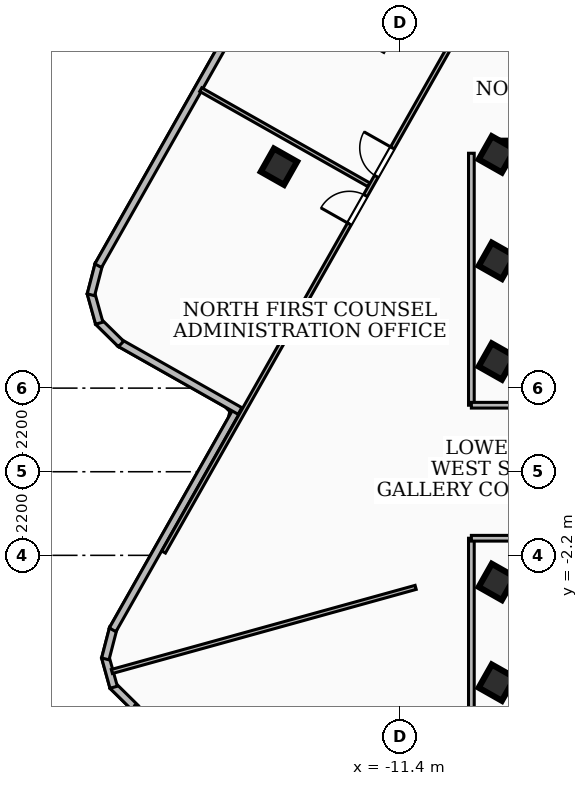
"""IFC4 building model, lengths in metres.
Left out: names, types, materials, properties, quantities, classifications, styles, units other than length and angle.
Written with IfcOpenShell. Run it as: python <this file> out.ifc"""

import sys

from ifc_helpers import new_model, si_unit, direction, frame, frame_2d, origin, origin_2d, place, context, subcontext, project, spatial, rectangle, extrude, element, fill, save


model = new_model("IFC4")
c1 = context("Model", 3, precision=1e-05, world=origin(), true_north=direction((0.0, 1.0)))
c2 = subcontext(c1, "Body", "Model", "MODEL_VIEW")
j1 = project(units=[si_unit("LENGTHUNIT", "METRE"), si_unit("PLANEANGLEUNIT", "RADIAN")], contexts=[c1])
p1 = place(None, origin())
s1 = spatial("IfcSite", under=j1, at=p1, CompositionType="ELEMENT")
p2 = place(p1, origin())
s2 = spatial("IfcBuilding", under=s1, at=p2, CompositionType="ELEMENT")
p3 = place(p2, frame((0.0, 0.0, 278.28)))
s3 = spatial("IfcBuildingStorey", under=s2, at=p3, CompositionType="ELEMENT", Elevation=278.28)
p4 = place(p3, frame((-8.78, 8.51, 0.0), z_axis=(0.0, 0.0, 1.0), x_axis=(1.0, 0.0, 0.0)))
e1 = element("IfcWall", 1, at=p4, inside=s3, PredefinedType="SHEAR", context=c2, shape_type="SweptSolid", body=[
    extrude(rectangle(XDim=17.56, YDim=0.4, at=frame_2d((8.78, 0.0))), origin(), (0.0, 0.0, 1.0), 3.16),
])
for number, where, z_axis, x_axis in (
    (2, (-8.85, -5.55, 0.0), (0.0, 0.0, 1.0), (0.493, 0.87, 0.0)),
    (3, (-8.85, -2.9, 0.0), (0.0, 0.0, 1.0), (0.493, 0.87, 0.0)),
    (4, (-8.85, 2.9, 0.0), (0.0, 0.0, 1.0), (0.493, 0.87, 0.0)),
    (5, (-8.85, 5.55, 0.0), (0.0, 0.0, 1.0), (0.493, 0.87, 0.0)),
    (6, (-8.85, 8.35, 0.0), (0.0, 0.0, 1.0), (0.493, 0.87, 0.0)),
    (7, (-14.583, 8.026, 0.0), (0.0, 0.0, 1.0), (0.493, 0.87, 0.0)),
):
    element("IfcColumn", number, at=place(p3, frame(where, z_axis=z_axis, x_axis=x_axis)), inside=s3, PredefinedType="COLUMN", context=c2, shape_type="SweptSolid", body=[
        extrude(rectangle(XDim=0.7, YDim=0.7, at=origin_2d()), origin(), (0.0, 0.0, 1.0), 3.42),
    ])
p5 = place(p3, frame((-18.359, -6.218, 0.0), z_axis=(0.0, 0.0, 1.0), x_axis=(-0.712466161804, 0.701706468749, 0.0)))
e8 = element("IfcWall", 8, at=p5, inside=s3, PredefinedType="SOLIDWALL", context=c2, shape_type="SweptSolid", body=[
    extrude(rectangle(XDim=0.84, YDim=0.2, at=frame_2d((0.42, 0.0))), origin(), (0.0, 0.0, 1.0), 3.16),
])
p6 = place(p3, frame((-18.932, -5.671, 0.0), z_axis=(0.0, 0.0, 1.0), x_axis=(-0.268377126675, 0.963313924885, 0.0)))
e9 = element("IfcWall", 9, at=p6, inside=s3, PredefinedType="SOLIDWALL", context=c2, shape_type="SweptSolid", body=[
    extrude(rectangle(XDim=0.824, YDim=0.2, at=frame_2d((0.412, 0.0))), origin(), (0.0, 0.0, 1.0), 3.16),
])
p7 = place(p3, frame((-19.152, -4.925, 0.0), z_axis=(0.0, 0.0, 1.0), x_axis=(0.250891369276, 0.968015248239, 0.0)))
e10 = element("IfcWall", 10, at=p7, inside=s3, PredefinedType="SOLIDWALL", context=c2, shape_type="SweptSolid", body=[
    extrude(rectangle(XDim=0.838, YDim=0.2, at=frame_2d((0.419, 0.0))), origin(), (0.0, 0.0, 1.0), 3.16),
])
p8 = place(p3, frame((-18.96, -4.16, 0.0), z_axis=(0.0, 0.0, 1.0), x_axis=(0.492441425139, 0.870345588147, 0.0)))
e11 = element("IfcWall", 11, at=p8, inside=s3, PredefinedType="SOLIDWALL", context=c2, shape_type="SweptSolid", body=[
    extrude(rectangle(XDim=6.742, YDim=0.2, at=frame_2d((3.371, 0.0))), origin(), (0.0, 0.0, 1.0), 3.16),
])
p9 = place(p3, frame((-15.609, 1.599, 0.0), z_axis=(0.0, 0.0, 1.0), x_axis=(-0.87036421417, 0.49240850388, 0.0)))
e12 = element("IfcWall", 12, at=p9, inside=s3, PredefinedType="SOLIDWALL", context=c2, shape_type="SweptSolid", body=[
    extrude(rectangle(XDim=3.641, YDim=0.2, at=frame_2d((1.821, 0.0))), origin(), (0.0, 0.0, 1.0), 3.16),
])
p10 = place(p3, frame((-18.738, 3.362, 0.0), z_axis=(0.0, 0.0, 1.0), x_axis=(-0.712468358306, 0.70170423856, 0.0)))
e13 = element("IfcWall", 13, at=p10, inside=s3, PredefinedType="SOLIDWALL", context=c2, shape_type="SweptSolid", body=[
    extrude(rectangle(XDim=0.839, YDim=0.2, at=frame_2d((0.419, 0.0))), origin(), (0.0, 0.0, 1.0), 3.16),
])
p11 = place(p3, frame((-19.311, 3.909, 0.0), z_axis=(0.0, 0.0, 1.0), x_axis=(-0.267720149776, 0.963496715824, 0.0)))
e14 = element("IfcWall", 14, at=p11, inside=s3, PredefinedType="SOLIDWALL", context=c2, shape_type="SweptSolid", body=[
    extrude(rectangle(XDim=0.825, YDim=0.2, at=frame_2d((0.413, 0.0))), origin(), (0.0, 0.0, 1.0), 3.16),
])
p12 = place(p3, frame((-19.531, 4.656, 0.0), z_axis=(0.0, 0.0, 1.0), x_axis=(0.250618286331, 0.968085985105, 0.0)))
e15 = element("IfcWall", 15, at=p12, inside=s3, PredefinedType="SOLIDWALL", context=c2, shape_type="SweptSolid", body=[
    extrude(rectangle(XDim=0.838, YDim=0.2, at=frame_2d((0.419, 0.0))), origin(), (0.0, 0.0, 1.0), 3.16),
])
p13 = place(p3, frame((-19.339, 5.421, 0.0), z_axis=(0.0, 0.0, 1.0), x_axis=(0.492615794655, 0.870246906835, 0.0)))
e16 = element("IfcWall", 16, at=p13, inside=s3, PredefinedType="SOLIDWALL", context=c2, shape_type="SweptSolid", body=[
    extrude(rectangle(XDim=10.124, YDim=0.2, at=frame_2d((5.062, 0.0))), origin(), (0.0, 0.0, 1.0), 3.16),
])
p14 = place(p13, frame((6.996, 0.0, 0.85)))
e17 = element("IfcOpeningElement", 17, at=p14, cuts=e16, PredefinedType="OPENING", context=c2, shape_type="SweptSolid", body=[
    extrude(rectangle(XDim=1.8, YDim=1.8, at=frame_2d((0.9, 0.9))), frame((0.0, 0.11, 0.0), z_axis=(0.0, -1.0, 0.0), x_axis=(1.0, 0.0, 0.0)), (0.0, 0.0, 1.0), 0.22),
])
p15 = place(p3, frame((-9.52, 1.75, 0.0), z_axis=(0.0, 0.0, 1.0), x_axis=(0.0, 1.0, 0.0)))
e18 = element("IfcWall", 18, at=p15, inside=s3, PredefinedType="PARTITIONING", context=c2, shape_type="SweptSolid", body=[
    extrude(rectangle(XDim=6.63, YDim=0.15, at=frame_2d((3.315, 0.0))), origin(), (0.0, 0.0, 1.0), 2.53),
])
p16 = place(p3, frame((-7.85, 1.75, 0.0), z_axis=(0.0, 0.0, 1.0), x_axis=(-1.0, 0.0, 0.0)))
e19 = element("IfcWall", 19, at=p16, inside=s3, PredefinedType="PARTITIONING", context=c2, shape_type="SweptSolid", body=[
    extrude(rectangle(XDim=1.67, YDim=0.15, at=frame_2d((0.835, 0.0))), origin(), (0.0, 0.0, 1.0), 2.39),
])
p17 = place(p3, frame((-9.52, -8.38, 0.0), z_axis=(0.0, 0.0, 1.0), x_axis=(0.0, 1.0, 0.0)))
e20 = element("IfcWall", 20, at=p17, inside=s3, PredefinedType="PARTITIONING", context=c2, shape_type="SweptSolid", body=[
    extrude(rectangle(XDim=6.63, YDim=0.15, at=frame_2d((3.315, 0.0))), origin(), (0.0, 0.0, 1.0), 3.16),
])
p18 = place(p3, frame((-7.85, -1.75, 0.0), z_axis=(0.0, 0.0, 1.0), x_axis=(-1.0, 0.0, 0.0)))
e21 = element("IfcWall", 21, at=p18, inside=s3, PredefinedType="PARTITIONING", context=c2, shape_type="SweptSolid", body=[
    extrude(rectangle(XDim=1.67, YDim=0.15, at=frame_2d((0.835, 0.0))), origin(), (0.0, 0.0, 1.0), 2.39),
])
p19 = place(p3, frame((-10.986, -3.043, 0.0), z_axis=(0.0, 0.0, 1.0), x_axis=(-0.963747373359, -0.266816416929, 0.0)))
e22 = element("IfcWall", 22, at=p19, inside=s3, PredefinedType="PARTITIONING", context=c2, shape_type="SweptSolid", body=[
    extrude(rectangle(XDim=8.295, YDim=0.11, at=frame_2d((4.147, 0.0))), origin(), (0.0, 0.0, 1.0), 3.16),
])
p20 = place(p3, frame((-12.216, 7.549, 0.0), z_axis=(0.0, 0.0, 1.0), x_axis=(-0.870245204201, 0.492618802488, 0.0)))
e23 = element("IfcWall", 23, at=p20, inside=s3, PredefinedType="PARTITIONING", context=c2, shape_type="SweptSolid", body=[
    extrude(rectangle(XDim=5.085, YDim=0.11, at=frame_2d((2.542, 0.0))), origin(), (0.0, 0.0, 1.0), 2.53),
])
p21 = place(p3, frame((-17.619, -2.113, 0.0), z_axis=(0.0, 0.0, 1.0), x_axis=(0.492746831558, 0.870172718482, 0.0)))
e24 = element("IfcWall", 24, at=p21, inside=s3, PredefinedType="PARTITIONING", context=c2, shape_type="SweptSolid", body=[
    extrude(rectangle(XDim=20.54, YDim=0.11, at=frame_2d((10.27, 0.0))), origin(), (0.0, 0.0, 1.0), 2.53),
])
p22 = place(p21, frame((11.36, 0.0, 0.0)))
e25 = element("IfcOpeningElement", 25, at=p22, cuts=e24, PredefinedType="OPENING", context=c2, shape_type="SweptSolid", body=[
    extrude(rectangle(XDim=0.86, YDim=2.04, at=frame_2d((0.43, 1.02))), frame((0.0, 0.065, 0.0), z_axis=(0.0, -1.0, 0.0), x_axis=(1.0, 0.0, 0.0)), (0.0, 0.0, 1.0), 0.13),
])
p23 = place(p21, frame((9.92, 0.0, 0.0)))
e26 = element("IfcOpeningElement", 26, at=p23, cuts=e24, PredefinedType="OPENING", context=c2, shape_type="SweptSolid", body=[
    extrude(rectangle(XDim=0.86, YDim=2.04, at=frame_2d((0.43, 1.02))), frame((0.0, 0.065, 0.0), z_axis=(0.0, -1.0, 0.0), x_axis=(1.0, 0.0, 0.0)), (0.0, 0.0, 1.0), 0.13),
])
p24 = place(p22, origin())
e27 = element("IfcDoor", 27, at=p24, inside=s3, OperationType="SINGLE_SWING_RIGHT", PredefinedType="DOOR", context=c2, shape_type="SweptSolid", body=[
    extrude(rectangle(XDim=0.86, YDim=2.04, at=frame_2d((0.43, 1.02))), frame((0.0, 0.025, 0.0), z_axis=(0.0, -1.0, 0.0), x_axis=(1.0, 0.0, 0.0)), (0.0, 0.0, 1.0), 0.05),
])
fill(e25, e27)
p25 = place(p23, origin())
e28 = element("IfcDoor", 28, at=p25, inside=s3, OperationType="SINGLE_SWING_LEFT", PredefinedType="DOOR", context=c2, shape_type="SweptSolid", body=[
    extrude(rectangle(XDim=0.86, YDim=2.04, at=frame_2d((0.43, 1.02))), frame((0.0, 0.025, 0.0), z_axis=(0.0, -1.0, 0.0), x_axis=(1.0, 0.0, 0.0)), (0.0, 0.0, 1.0), 0.05),
])
fill(e26, e28)
save(model, sys.argv[1])
